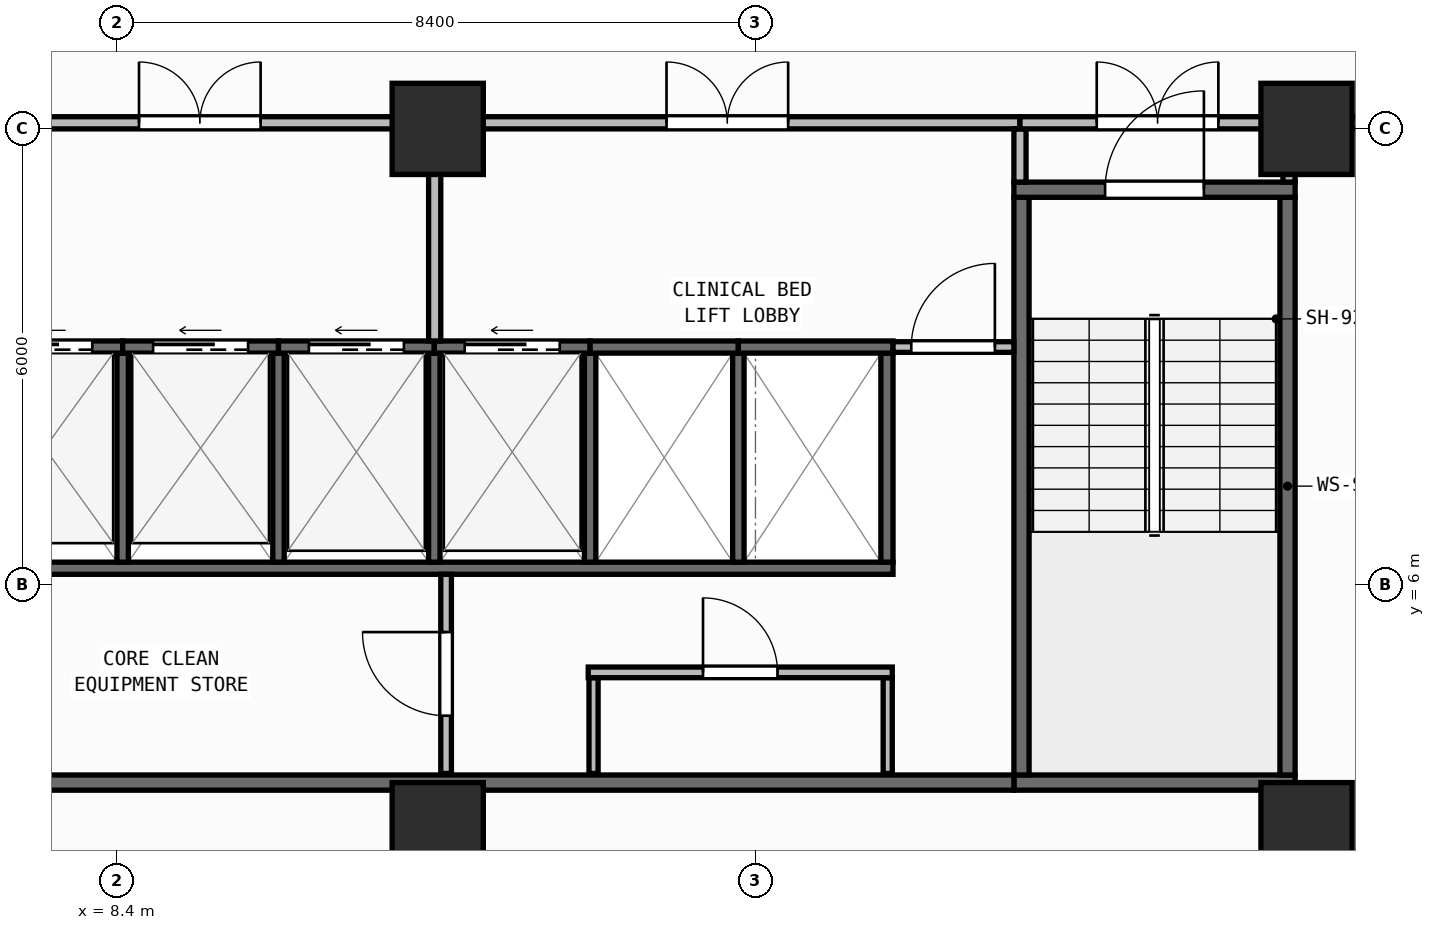
"""IFC4 building model, lengths in metres.
Left out: names, types, materials, properties, quantities, classifications, styles, units other than length and angle.
Written with IfcOpenShell. Run it as: python <this file> out.ifc"""

import sys

from ifc_helpers import new_model, si_unit, direction, frame, frame_2d, origin, origin_2d, place, context, subcontext, project, spatial, rectangle, extrude, element, fill, save


model = new_model("IFC4")
c1 = context("Model", 3, precision=1e-05, world=origin(), true_north=direction((0.0, 1.0)))
c2 = subcontext(c1, "Body", "Model", "MODEL_VIEW")
j1 = project(units=[si_unit("LENGTHUNIT", "METRE"), si_unit("PLANEANGLEUNIT", "RADIAN")], contexts=[c1])
p1 = place(None, origin())
s1 = spatial("IfcSite", under=j1, at=p1, CompositionType="ELEMENT")
p2 = place(p1, origin())
s2 = spatial("IfcBuilding", under=s1, at=p2, CompositionType="ELEMENT")
p3 = place(p2, frame((0.0, 0.0, 127.05)))
s3 = spatial("IfcBuildingStorey", under=s2, at=p3, CompositionType="ELEMENT", Elevation=127.05)
for number, where, z_axis, x_axis in (
    (1, (12.62, 2.8, 0.0), (0.0, 0.0, 1.0), (1.0, 0.0, 0.0)),
    (2, (24.05, 2.8, 0.0), (0.0, 0.0, 1.0), (1.0, 0.0, 0.0)),
    (3, (12.62, 12.0, 0.0), (0.0, 0.0, 1.0), (1.0, 0.0, 0.0)),
    (4, (24.05, 12.0, 0.0), (0.0, 0.0, 1.0), (1.0, 0.0, 0.0)),
):
    element("IfcColumn", number, at=place(p3, frame(where, z_axis=z_axis, x_axis=x_axis)), inside=s3, PredefinedType="COLUMN", context=c2, shape_type="SweptSolid", body=[
        extrude(rectangle(XDim=1.2, YDim=1.2, at=origin_2d()), origin(), (0.0, 0.0, 1.0), 3.95),
    ])
p4 = place(p3, frame((2.76, 0.173, 0.0), z_axis=(0.0, 0.0, 1.0), x_axis=(0.996857931723, 0.079210251617, 0.0)))
e5 = element("IfcWall", 5, at=p4, inside=s3, PredefinedType="STANDARD", context=c2, shape_type="SweptSolid", body=[
    extrude(rectangle(XDim=51.442, YDim=0.26, at=frame_2d((25.721, 0.0))), origin(), (0.0, 0.0, 1.0), 3.71),
])
p5 = place(p4, frame((24.521, 0.0, 0.9)))
e6 = element("IfcOpeningElement", 6, at=p5, cuts=e5, PredefinedType="OPENING", context=c2, shape_type="SweptSolid", body=[
    extrude(rectangle(XDim=2.4, YDim=1.65, at=frame_2d((1.2, 0.825))), frame((0.0, 0.14, 0.0), z_axis=(0.0, -1.0, 0.0), x_axis=(1.0, 0.0, 0.0)), (0.0, 0.0, 1.0), 0.28),
])
p6 = place(p3, frame((20.2, 3.4, 0.0), z_axis=(0.0, 0.0, 1.0), x_axis=(1.0, 0.0, 0.0)))
e7 = element("IfcWall", 7, at=p6, inside=s3, PredefinedType="SHEAR", context=c2, shape_type="SweptSolid", body=[
    extrude(rectangle(XDim=3.7, YDim=0.2, at=frame_2d((1.85, 0.0))), origin(), (0.0, 0.0, 1.0), 3.71),
])
for number, where, z_axis, x_axis in (
    (8, (20.3, 3.5, 0.0), (0.0, 0.0, 1.0), (0.0, 1.0, 0.0)),
    (9, (23.8, 3.5, 0.0), (0.0, 0.0, 1.0), (0.0, 1.0, 0.0)),
):
    element("IfcWall", number, at=place(p3, frame(where, z_axis=z_axis, x_axis=x_axis)), inside=s3, PredefinedType="SHEAR", context=c2, shape_type="SweptSolid", body=[
        extrude(rectangle(XDim=7.6, YDim=0.2, at=frame_2d((3.8, 0.0))), origin(), (0.0, 0.0, 1.0), 3.71),
    ])
p7 = place(p3, frame((20.2, 11.2, 0.0), z_axis=(0.0, 0.0, 1.0), x_axis=(1.0, 0.0, 0.0)))
e10 = element("IfcWall", 10, at=p7, inside=s3, PredefinedType="SHEAR", context=c2, shape_type="SweptSolid", body=[
    extrude(rectangle(XDim=3.7, YDim=0.2, at=frame_2d((1.85, 0.0))), origin(), (0.0, 0.0, 1.0), 3.71),
])
p8 = place(p7, frame((1.2, 0.0, 0.0)))
e11 = element("IfcOpeningElement", 11, at=p8, cuts=e10, PredefinedType="OPENING", context=c2, shape_type="SweptSolid", body=[
    extrude(rectangle(XDim=1.3, YDim=2.15, at=frame_2d((0.65, 1.075))), frame((0.0, 0.11, 0.0), z_axis=(0.0, -1.0, 0.0), x_axis=(1.0, 0.0, 0.0)), (0.0, 0.0, 1.0), 0.22),
])
p9 = place(p3, frame((6.5, 3.4, 0.0), z_axis=(0.0, 0.0, 1.0), x_axis=(1.0, 0.0, 0.0)))
e12 = element("IfcWall", 12, at=p9, inside=s3, PredefinedType="SHEAR", context=c2, shape_type="SweptSolid", body=[
    extrude(rectangle(XDim=13.7, YDim=0.2, at=frame_2d((6.85, 0.0))), origin(), (0.0, 0.0, 1.0), 3.71),
])
p10 = place(p3, frame((6.5, 6.22, 0.0), z_axis=(0.0, 0.0, 1.0), x_axis=(1.0, 0.0, 0.0)))
e13 = element("IfcWall", 13, at=p10, inside=s3, PredefinedType="SHEAR", context=c2, shape_type="SweptSolid", body=[
    extrude(rectangle(XDim=12.11, YDim=0.16, at=frame_2d((6.055, 0.0))), origin(), (0.0, 0.0, 1.0), 3.71),
])
p11 = place(p3, frame((18.53, 6.3, 0.0), z_axis=(0.0, 0.0, 1.0), x_axis=(0.0, 1.0, 0.0)))
e14 = element("IfcWall", 14, at=p11, inside=s3, PredefinedType="SHEAR", context=c2, shape_type="SweptSolid", body=[
    extrude(rectangle(XDim=2.75, YDim=0.16, at=frame_2d((1.375, 0.0))), origin(), (0.0, 0.0, 1.0), 3.71),
])
for number, where, z_axis, x_axis in (
    (15, (8.475, 6.3, 0.0), (0.0, 0.0, 1.0), (0.0, 1.0, 0.0)),
    (16, (10.525, 6.3, 0.0), (0.0, 0.0, 1.0), (0.0, 1.0, 0.0)),
    (17, (12.575, 6.3, 0.0), (0.0, 0.0, 1.0), (0.0, 1.0, 0.0)),
    (18, (14.625, 6.3, 0.0), (0.0, 0.0, 1.0), (0.0, 1.0, 0.0)),
    (19, (16.575, 6.3, 0.0), (0.0, 0.0, 1.0), (0.0, 1.0, 0.0)),
):
    element("IfcWall", number, at=place(p3, frame(where, z_axis=z_axis, x_axis=x_axis)), inside=s3, PredefinedType="SHEAR", context=c2, shape_type="SweptSolid", body=[
        extrude(rectangle(XDim=2.75, YDim=0.15, at=frame_2d((1.375, 0.0))), origin(), (0.0, 0.0, 1.0), 3.71),
    ])
p12 = place(p3, frame((6.5, 9.13, 0.0), z_axis=(0.0, 0.0, 1.0), x_axis=(1.0, 0.0, 0.0)))
e20 = element("IfcWall", 20, at=p12, inside=s3, PredefinedType="SHEAR", context=c2, shape_type="SweptSolid", body=[
    extrude(rectangle(XDim=1.975, YDim=0.16, at=frame_2d((0.988, 0.0))), origin(), (0.0, 0.0, 1.0), 3.71),
])
p13 = place(p12, frame((0.325, 0.0, 0.0)))
e21 = element("IfcOpeningElement", 21, at=p13, cuts=e20, PredefinedType="OPENING", context=c2, shape_type="SweptSolid", body=[
    extrude(rectangle(XDim=1.25, YDim=2.15, at=frame_2d((0.625, 1.075))), frame((0.0, 0.09, 0.0), z_axis=(0.0, -1.0, 0.0), x_axis=(1.0, 0.0, 0.0)), (0.0, 0.0, 1.0), 0.18),
])
p14 = place(p3, frame((8.475, 9.13, 0.0), z_axis=(0.0, 0.0, 1.0), x_axis=(1.0, 0.0, 0.0)))
e22 = element("IfcWall", 22, at=p14, inside=s3, PredefinedType="SHEAR", context=c2, shape_type="SweptSolid", body=[
    extrude(rectangle(XDim=2.05, YDim=0.16, at=frame_2d((1.025, 0.0))), origin(), (0.0, 0.0, 1.0), 3.71),
])
p15 = place(p14, frame((0.4, 0.0, 0.0)))
e23 = element("IfcOpeningElement", 23, at=p15, cuts=e22, PredefinedType="OPENING", context=c2, shape_type="SweptSolid", body=[
    extrude(rectangle(XDim=1.25, YDim=2.15, at=frame_2d((0.625, 1.075))), frame((0.0, 0.09, 0.0), z_axis=(0.0, -1.0, 0.0), x_axis=(1.0, 0.0, 0.0)), (0.0, 0.0, 1.0), 0.18),
])
p16 = place(p3, frame((10.525, 9.13, 0.0), z_axis=(0.0, 0.0, 1.0), x_axis=(1.0, 0.0, 0.0)))
e24 = element("IfcWall", 24, at=p16, inside=s3, PredefinedType="SHEAR", context=c2, shape_type="SweptSolid", body=[
    extrude(rectangle(XDim=2.05, YDim=0.16, at=frame_2d((1.025, 0.0))), origin(), (0.0, 0.0, 1.0), 3.71),
])
p17 = place(p16, frame((0.4, 0.0, 0.0)))
e25 = element("IfcOpeningElement", 25, at=p17, cuts=e24, PredefinedType="OPENING", context=c2, shape_type="SweptSolid", body=[
    extrude(rectangle(XDim=1.25, YDim=2.15, at=frame_2d((0.625, 1.075))), frame((0.0, 0.09, 0.0), z_axis=(0.0, -1.0, 0.0), x_axis=(1.0, 0.0, 0.0)), (0.0, 0.0, 1.0), 0.18),
])
p18 = place(p3, frame((12.575, 9.13, 0.0), z_axis=(0.0, 0.0, 1.0), x_axis=(1.0, 0.0, 0.0)))
e26 = element("IfcWall", 26, at=p18, inside=s3, PredefinedType="SHEAR", context=c2, shape_type="SweptSolid", body=[
    extrude(rectangle(XDim=2.05, YDim=0.16, at=frame_2d((1.025, 0.0))), origin(), (0.0, 0.0, 1.0), 3.71),
])
p19 = place(p18, frame((0.4, 0.0, 0.0)))
e27 = element("IfcOpeningElement", 27, at=p19, cuts=e26, PredefinedType="OPENING", context=c2, shape_type="SweptSolid", body=[
    extrude(rectangle(XDim=1.25, YDim=2.15, at=frame_2d((0.625, 1.075))), frame((0.0, 0.09, 0.0), z_axis=(0.0, -1.0, 0.0), x_axis=(1.0, 0.0, 0.0)), (0.0, 0.0, 1.0), 0.18),
])
p20 = place(p3, frame((14.625, 9.13, 0.0), z_axis=(0.0, 0.0, 1.0), x_axis=(1.0, 0.0, 0.0)))
e28 = element("IfcWall", 28, at=p20, inside=s3, PredefinedType="SHEAR", context=c2, shape_type="SweptSolid", body=[
    extrude(rectangle(XDim=1.95, YDim=0.16, at=frame_2d((0.975, 0.0))), origin(), (0.0, 0.0, 1.0), 3.71),
])
p21 = place(p3, frame((16.575, 9.13, 0.0), z_axis=(0.0, 0.0, 1.0), x_axis=(1.0, 0.0, 0.0)))
e29 = element("IfcWall", 29, at=p21, inside=s3, PredefinedType="SHEAR", context=c2, shape_type="SweptSolid", body=[
    extrude(rectangle(XDim=2.035, YDim=0.16, at=frame_2d((1.018, 0.0))), origin(), (0.0, 0.0, 1.0), 3.71),
])
p22 = place(p3, frame((12.73, 3.52, 0.0), z_axis=(0.0, 0.0, 1.0), x_axis=(0.0, 1.0, 0.0)))
e30 = element("IfcWall", 30, at=p22, inside=s3, PredefinedType="PARTITIONING", context=c2, shape_type="SweptSolid", body=[
    extrude(rectangle(XDim=2.62, YDim=0.14, at=frame_2d((1.31, 0.0))), origin(), (0.0, 0.0, 1.0), 3.71),
])
p23 = place(p22, frame((0.76, 0.0, 0.0)))
e31 = element("IfcOpeningElement", 31, at=p23, cuts=e30, PredefinedType="OPENING", context=c2, shape_type="SweptSolid", body=[
    extrude(rectangle(XDim=1.1, YDim=2.1, at=frame_2d((0.55, 1.05))), frame((0.0, 0.08, 0.0), z_axis=(0.0, -1.0, 0.0), x_axis=(1.0, 0.0, 0.0)), (0.0, 0.0, 1.0), 0.16),
])
for number, where, z_axis, x_axis in (
    (32, (14.67, 3.52, 0.0), (0.0, 0.0, 1.0), (0.0, 1.0, 0.0)),
    (33, (18.54, 3.52, 0.0), (0.0, 0.0, 1.0), (0.0, 1.0, 0.0)),
):
    element("IfcWall", number, at=place(p3, frame(where, z_axis=z_axis, x_axis=x_axis)), inside=s3, PredefinedType="PARTITIONING", context=c2, shape_type="SweptSolid", body=[
        extrude(rectangle(XDim=1.26, YDim=0.12, at=frame_2d((0.63, 0.0))), origin(), (0.0, 0.0, 1.0), 3.71),
    ])
p24 = place(p3, frame((14.6, 4.85, 0.0), z_axis=(0.0, 0.0, 1.0), x_axis=(1.0, 0.0, 0.0)))
e34 = element("IfcWall", 34, at=p24, inside=s3, PredefinedType="PARTITIONING", context=c2, shape_type="SweptSolid", body=[
    extrude(rectangle(XDim=4.0, YDim=0.14, at=frame_2d((2.0, 0.0))), origin(), (0.0, 0.0, 1.0), 3.71),
])
p25 = place(p24, frame((1.51, 0.0, 0.0)))
e35 = element("IfcOpeningElement", 35, at=p25, cuts=e34, PredefinedType="OPENING", context=c2, shape_type="SweptSolid", body=[
    extrude(rectangle(XDim=0.98, YDim=2.1, at=frame_2d((0.49, 1.05))), frame((0.0, 0.08, 0.0), z_axis=(0.0, -1.0, 0.0), x_axis=(1.0, 0.0, 0.0)), (0.0, 0.0, 1.0), 0.16),
])
p26 = place(p3, frame((18.61, 9.13, 0.0), z_axis=(0.0, 0.0, 1.0), x_axis=(1.0, 0.0, 0.0)))
e36 = element("IfcWall", 36, at=p26, inside=s3, PredefinedType="PARTITIONING", context=c2, shape_type="SweptSolid", body=[
    extrude(rectangle(XDim=1.59, YDim=0.14, at=frame_2d((0.795, 0.0))), origin(), (0.0, 0.0, 1.0), 3.71),
])
p27 = place(p26, frame((0.24, 0.0, 0.0)))
e37 = element("IfcOpeningElement", 37, at=p27, cuts=e36, PredefinedType="OPENING", context=c2, shape_type="SweptSolid", body=[
    extrude(rectangle(XDim=1.1, YDim=2.1, at=frame_2d((0.55, 1.05))), frame((0.0, 0.08, 0.0), z_axis=(0.0, -1.0, 0.0), x_axis=(1.0, 0.0, 0.0)), (0.0, 0.0, 1.0), 0.16),
])
p28 = place(p3, frame((6.4, 12.08, 0.0), z_axis=(0.0, 0.0, 1.0), x_axis=(1.0, 0.0, 0.0)))
e38 = element("IfcWall", 38, at=p28, inside=s3, PredefinedType="PARTITIONING", context=c2, shape_type="SweptSolid", body=[
    extrude(rectangle(XDim=6.18, YDim=0.16, at=frame_2d((3.09, 0.0))), origin(), (0.0, 0.0, 1.0), 3.083),
])
p29 = place(p28, frame((2.29, 0.0, 0.0)))
e39 = element("IfcOpeningElement", 39, at=p29, cuts=e38, PredefinedType="OPENING", context=c2, shape_type="SweptSolid", body=[
    extrude(rectangle(XDim=1.6, YDim=2.05, at=frame_2d((0.8, 1.025))), frame((0.0, 0.09, 0.0), z_axis=(0.0, -1.0, 0.0), x_axis=(1.0, 0.0, 0.0)), (0.0, 0.0, 1.0), 0.18),
])
p30 = place(p3, frame((12.58, 9.21, 0.0), z_axis=(0.0, 0.0, 1.0), x_axis=(0.0, 1.0, 0.0)))
e40 = element("IfcWall", 40, at=p30, inside=s3, PredefinedType="PARTITIONING", context=c2, shape_type="SweptSolid", body=[
    extrude(rectangle(XDim=2.79, YDim=0.16, at=frame_2d((1.395, 0.0))), origin(), (0.0, 0.0, 1.0), 3.71),
])
p31 = place(p3, frame((12.58, 12.08, 0.0), z_axis=(0.0, 0.0, 1.0), x_axis=(1.0, 0.0, 0.0)))
e41 = element("IfcWall", 41, at=p31, inside=s3, PredefinedType="PARTITIONING", context=c2, shape_type="SweptSolid", body=[
    extrude(rectangle(XDim=7.7, YDim=0.16, at=frame_2d((3.85, 0.0))), origin(), (0.0, 0.0, 1.0), 3.083),
])
p32 = place(p31, frame((3.05, 0.0, 0.0)))
e42 = element("IfcOpeningElement", 42, at=p32, cuts=e41, PredefinedType="OPENING", context=c2, shape_type="SweptSolid", body=[
    extrude(rectangle(XDim=1.6, YDim=2.05, at=frame_2d((0.8, 1.025))), frame((0.0, 0.09, 0.0), z_axis=(0.0, -1.0, 0.0), x_axis=(1.0, 0.0, 0.0)), (0.0, 0.0, 1.0), 0.18),
])
p33 = place(p3, frame((20.28, 11.3, 0.0), z_axis=(0.0, 0.0, 1.0), x_axis=(0.0, 1.0, 0.0)))
e43 = element("IfcWall", 43, at=p33, inside=s3, PredefinedType="PARTITIONING", context=c2, shape_type="SweptSolid", body=[
    extrude(rectangle(XDim=0.7, YDim=0.16, at=frame_2d((0.35, 0.0))), origin(), (0.0, 0.0, 1.0), 3.71),
])
p34 = place(p3, frame((20.28, 12.08, 0.0), z_axis=(0.0, 0.0, 1.0), x_axis=(1.0, 0.0, 0.0)))
e44 = element("IfcWall", 44, at=p34, inside=s3, PredefinedType="PARTITIONING", context=c2, shape_type="SweptSolid", body=[
    extrude(rectangle(XDim=3.62, YDim=0.16, at=frame_2d((1.81, 0.0))), origin(), (0.0, 0.0, 1.0), 3.083),
])
p35 = place(p34, frame((1.01, 0.0, 0.0)))
e45 = element("IfcOpeningElement", 45, at=p35, cuts=e44, PredefinedType="OPENING", context=c2, shape_type="SweptSolid", body=[
    extrude(rectangle(XDim=1.6, YDim=2.05, at=frame_2d((0.8, 1.025))), frame((0.0, 0.09, 0.0), z_axis=(0.0, -1.0, 0.0), x_axis=(1.0, 0.0, 0.0)), (0.0, 0.0, 1.0), 0.18),
])
p36 = place(p3, frame((23.82, 11.3, 0.0), z_axis=(0.0, 0.0, 1.0), x_axis=(0.0, 1.0, 0.0)))
e46 = element("IfcWall", 46, at=p36, inside=s3, PredefinedType="PARTITIONING", context=c2, shape_type="SweptSolid", body=[
    extrude(rectangle(XDim=0.7, YDim=0.16, at=frame_2d((0.35, 0.0))), origin(), (0.0, 0.0, 1.0), 3.71),
])
p37 = place(p3, frame((24.02, 12.08, 0.0), z_axis=(0.0, 0.0, 1.0), x_axis=(1.0, 0.0, 0.0)))
e47 = element("IfcWall", 47, at=p37, inside=s3, PredefinedType="PARTITIONING", context=c2, shape_type="SweptSolid", body=[
    extrude(rectangle(XDim=1.245, YDim=0.16, at=frame_2d((0.623, 0.0))), origin(), (0.0, 0.0, 1.0), 3.083),
])
p38 = place(p8, origin())
e48 = element("IfcDoor", 48, at=p38, inside=s3, OperationType="SINGLE_SWING_RIGHT", PredefinedType="DOOR", context=c2, shape_type="SweptSolid", body=[
    extrude(rectangle(XDim=1.3, YDim=2.15, at=frame_2d((0.65, 1.075))), frame((0.0, 0.025, 0.0), z_axis=(0.0, -1.0, 0.0), x_axis=(1.0, 0.0, 0.0)), (0.0, 0.0, 1.0), 0.05),
])
fill(e11, e48)
p39 = place(p13, origin())
e49 = element("IfcDoor", 49, at=p39, inside=s3, OperationType="SLIDING_TO_LEFT", PredefinedType="DOOR", context=c2, shape_type="SweptSolid", body=[
    extrude(rectangle(XDim=1.25, YDim=2.15, at=frame_2d((0.625, 1.075))), frame((0.0, 0.025, 0.0), z_axis=(0.0, -1.0, 0.0), x_axis=(1.0, 0.0, 0.0)), (0.0, 0.0, 1.0), 0.05),
])
fill(e21, e49)
p40 = place(p15, origin())
e50 = element("IfcDoor", 50, at=p40, inside=s3, OperationType="SLIDING_TO_LEFT", PredefinedType="DOOR", context=c2, shape_type="SweptSolid", body=[
    extrude(rectangle(XDim=1.25, YDim=2.15, at=frame_2d((0.625, 1.075))), frame((0.0, 0.025, 0.0), z_axis=(0.0, -1.0, 0.0), x_axis=(1.0, 0.0, 0.0)), (0.0, 0.0, 1.0), 0.05),
])
fill(e23, e50)
p41 = place(p17, origin())
e51 = element("IfcDoor", 51, at=p41, inside=s3, OperationType="SLIDING_TO_LEFT", PredefinedType="DOOR", context=c2, shape_type="SweptSolid", body=[
    extrude(rectangle(XDim=1.25, YDim=2.15, at=frame_2d((0.625, 1.075))), frame((0.0, 0.025, 0.0), z_axis=(0.0, -1.0, 0.0), x_axis=(1.0, 0.0, 0.0)), (0.0, 0.0, 1.0), 0.05),
])
fill(e25, e51)
p42 = place(p19, origin())
e52 = element("IfcDoor", 52, at=p42, inside=s3, OperationType="SLIDING_TO_LEFT", PredefinedType="DOOR", context=c2, shape_type="SweptSolid", body=[
    extrude(rectangle(XDim=1.25, YDim=2.15, at=frame_2d((0.625, 1.075))), frame((0.0, 0.025, 0.0), z_axis=(0.0, -1.0, 0.0), x_axis=(1.0, 0.0, 0.0)), (0.0, 0.0, 1.0), 0.05),
])
fill(e27, e52)
p43 = place(p23, origin())
e53 = element("IfcDoor", 53, at=p43, inside=s3, OperationType="SINGLE_SWING_RIGHT", PredefinedType="DOOR", context=c2, shape_type="SweptSolid", body=[
    extrude(rectangle(XDim=1.1, YDim=2.1, at=frame_2d((0.55, 1.05))), frame((0.0, 0.025, 0.0), z_axis=(0.0, -1.0, 0.0), x_axis=(1.0, 0.0, 0.0)), (0.0, 0.0, 1.0), 0.05),
])
fill(e31, e53)
p44 = place(p25, origin())
e54 = element("IfcDoor", 54, at=p44, inside=s3, OperationType="SINGLE_SWING_LEFT", PredefinedType="DOOR", context=c2, shape_type="SweptSolid", body=[
    extrude(rectangle(XDim=0.98, YDim=2.1, at=frame_2d((0.49, 1.05))), frame((0.0, 0.025, 0.0), z_axis=(0.0, -1.0, 0.0), x_axis=(1.0, 0.0, 0.0)), (0.0, 0.0, 1.0), 0.05),
])
fill(e35, e54)
p45 = place(p27, origin())
e55 = element("IfcDoor", 55, at=p45, inside=s3, OperationType="SINGLE_SWING_RIGHT", PredefinedType="DOOR", context=c2, shape_type="SweptSolid", body=[
    extrude(rectangle(XDim=1.1, YDim=2.1, at=frame_2d((0.55, 1.05))), frame((0.0, 0.025, 0.0), z_axis=(0.0, -1.0, 0.0), x_axis=(1.0, 0.0, 0.0)), (0.0, 0.0, 1.0), 0.05),
])
fill(e37, e55)
p46 = place(p29, origin())
e56 = element("IfcDoor", 56, at=p46, inside=s3, OperationType="DOUBLE_DOOR_SINGLE_SWING", PredefinedType="DOOR", context=c2, shape_type="SweptSolid", body=[
    extrude(rectangle(XDim=1.6, YDim=2.05, at=frame_2d((0.8, 1.025))), frame((0.0, 0.025, 0.0), z_axis=(0.0, -1.0, 0.0), x_axis=(1.0, 0.0, 0.0)), (0.0, 0.0, 1.0), 0.05),
])
fill(e39, e56)
p47 = place(p32, origin())
e57 = element("IfcDoor", 57, at=p47, inside=s3, OperationType="DOUBLE_DOOR_SINGLE_SWING", PredefinedType="DOOR", context=c2, shape_type="SweptSolid", body=[
    extrude(rectangle(XDim=1.6, YDim=2.05, at=frame_2d((0.8, 1.025))), frame((0.0, 0.025, 0.0), z_axis=(0.0, -1.0, 0.0), x_axis=(1.0, 0.0, 0.0)), (0.0, 0.0, 1.0), 0.05),
])
fill(e42, e57)
p48 = place(p35, origin())
e58 = element("IfcDoor", 58, at=p48, inside=s3, OperationType="DOUBLE_DOOR_SINGLE_SWING", PredefinedType="DOOR", context=c2, shape_type="SweptSolid", body=[
    extrude(rectangle(XDim=1.6, YDim=2.05, at=frame_2d((0.8, 1.025))), frame((0.0, 0.025, 0.0), z_axis=(0.0, -1.0, 0.0), x_axis=(1.0, 0.0, 0.0)), (0.0, 0.0, 1.0), 0.05),
])
fill(e45, e58)
save(model, sys.argv[1])
